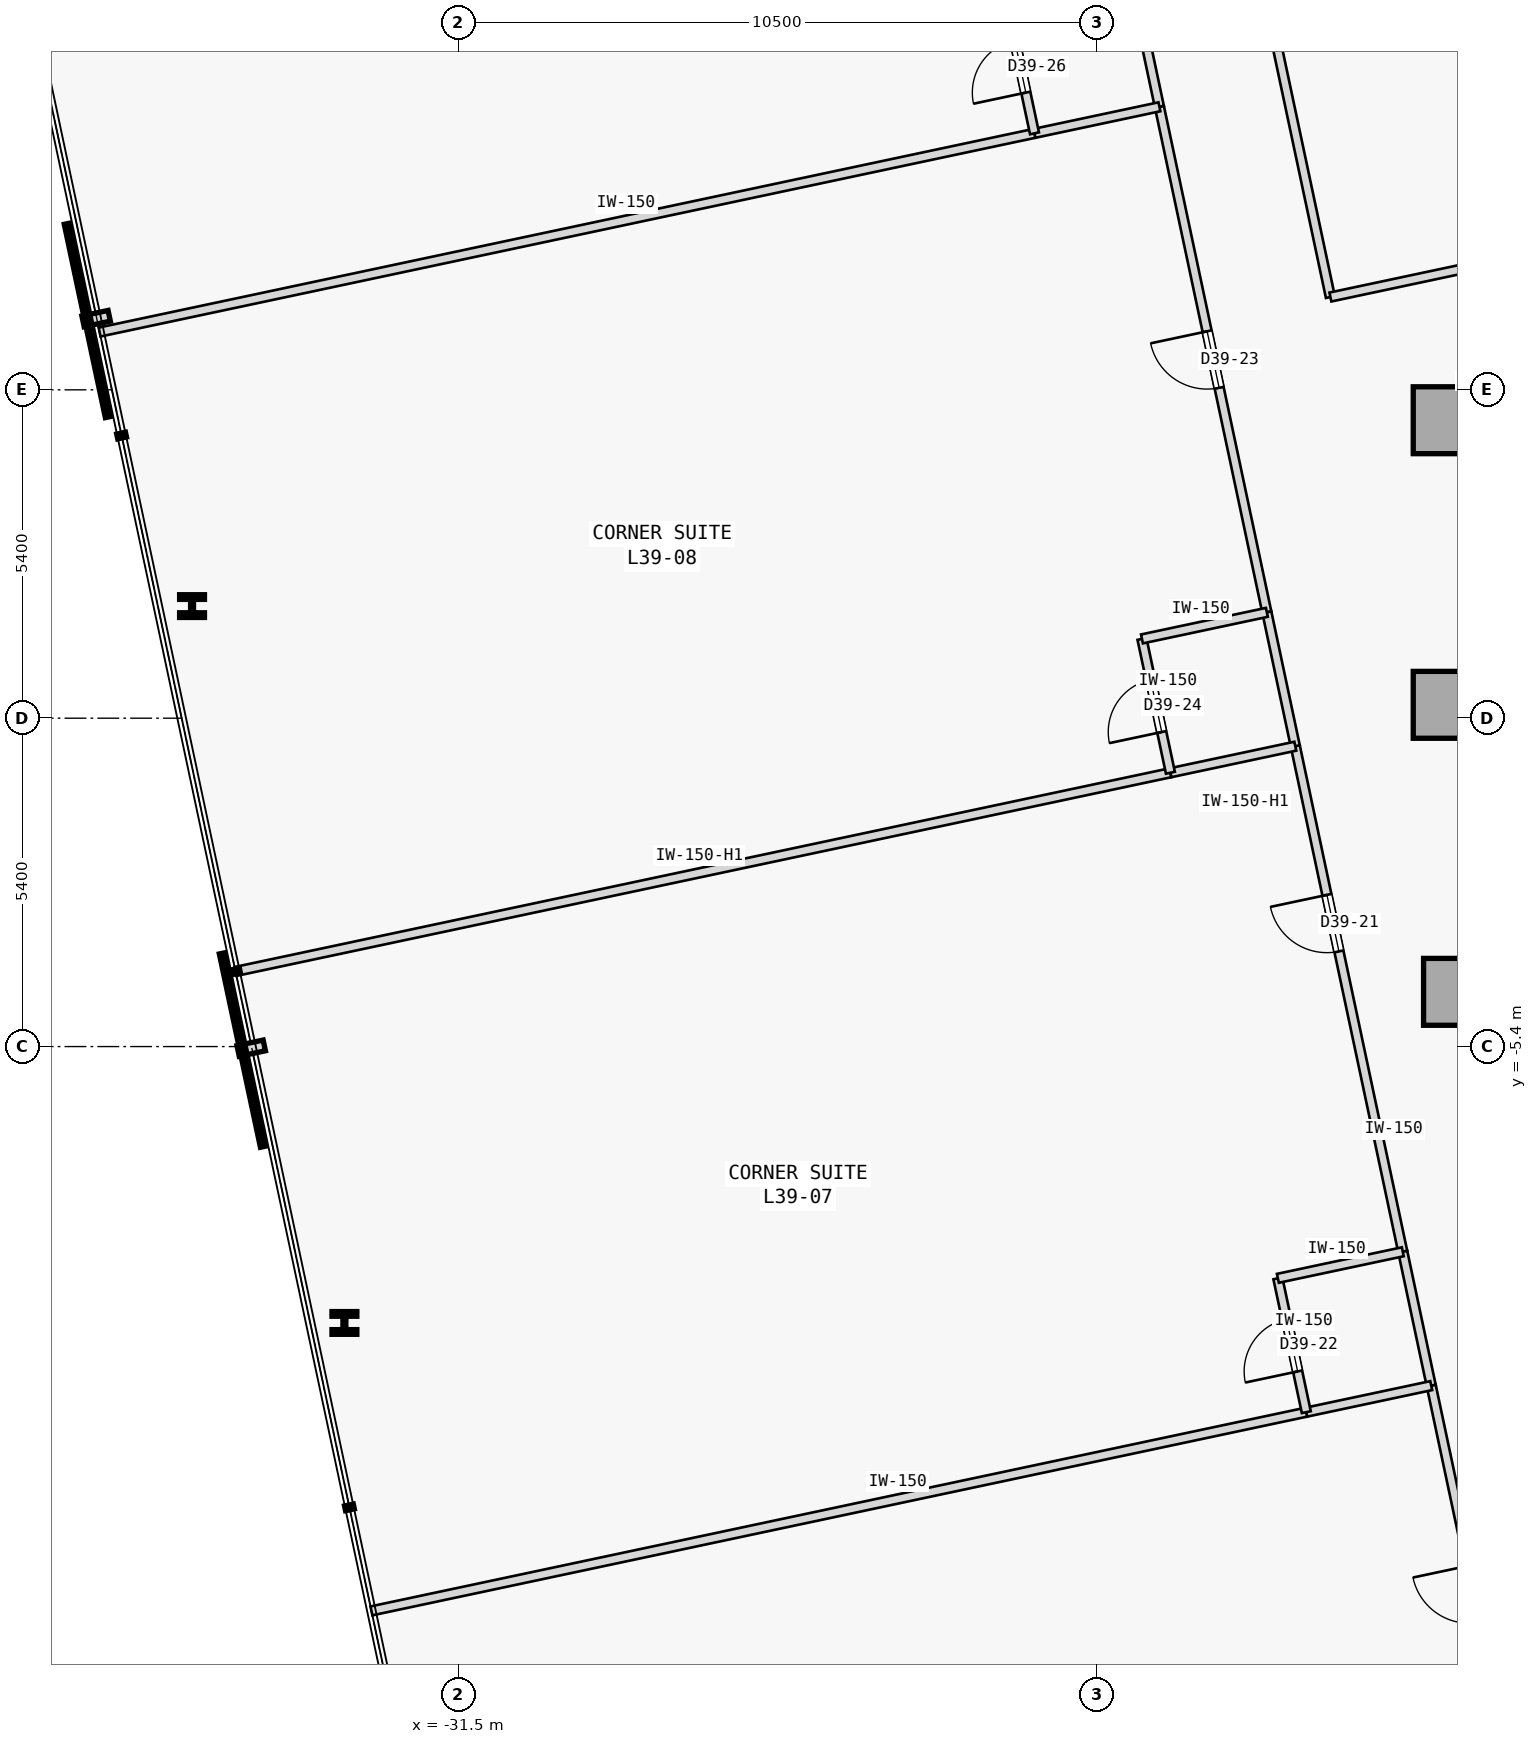
"""IFC4 building model, lengths in metres.
Left out: names, types, materials, properties, quantities, classifications, styles, units other than length and angle.
Written with IfcOpenShell. Run it as: python <this file> out.ifc"""

import sys

from ifc_helpers import new_model, si_unit, direction, frame, frame_2d, origin, origin_2d, place, context, subcontext, project, spatial, rectangle, i_section, extrude, element, fill, save


model = new_model("IFC4")
c1 = context("Model", 3, precision=1e-05, world=origin(), true_north=direction((0.0, 1.0)))
c2 = subcontext(c1, "Body", "Model", "MODEL_VIEW")
j1 = project(units=[si_unit("LENGTHUNIT", "METRE"), si_unit("PLANEANGLEUNIT", "RADIAN")], contexts=[c1])
p1 = place(None, origin())
s1 = spatial("IfcSite", under=j1, at=p1, CompositionType="ELEMENT")
p2 = place(p1, origin())
s2 = spatial("IfcBuilding", under=s1, at=p2, CompositionType="ELEMENT")
p3 = place(p2, frame((0.0, 0.0, 154.8)))
s3 = spatial("IfcBuildingStorey", under=s2, at=p3, CompositionType="ELEMENT", Elevation=154.8)
for number, where, z_axis, x_axis in (
    (1, (-15.25, 4.9, 0.0), (0.0, 0.0, 1.0), (1.0, 0.0, 0.0)),
    (2, (-15.25, 0.22, 0.0), (0.0, 0.0, 1.0), (1.0, 0.0, 0.0)),
    (3, (-15.08, -4.5, 0.0), (0.0, 0.0, 1.0), (1.0, 0.0, 0.0)),
):
    element("IfcColumn", number, at=place(p3, frame(where, z_axis=z_axis, x_axis=x_axis)), inside=s3, PredefinedType="COLUMN", context=c2, shape_type="SweptSolid", body=[
        extrude(rectangle(XDim=1.1, YDim=1.1, at=origin_2d()), origin(), (0.0, 0.0, 1.0), 3.4),
    ])
for number, where, z_axis, x_axis in (
    (4, (-35.883, 1.844, 0.0), (0.0, 0.0, 1.0), (1.0, 0.0, 0.0)),
    (5, (-33.377, -9.945, 0.0), (0.0, 0.0, 1.0), (1.0, 0.0, 0.0)),
):
    element("IfcColumn", number, at=place(p3, frame(where, z_axis=z_axis, x_axis=x_axis)), inside=s3, PredefinedType="COLUMN", context=c2, shape_type="SweptSolid", body=[
        extrude(i_section(OverallWidth=0.409, OverallDepth=0.374, WebThickness=0.048, FlangeThickness=0.077, FilletRadius=0.015, at=origin_2d()), origin(), (0.0, 0.0, 1.0), 3.4),
    ])
p4 = place(p3, frame((-17.162, 6.926, 0.0), z_axis=(0.0, 0.0, 1.0), x_axis=(-0.207911421929, 0.978147657888, 0.0)))
e6 = element("IfcWall", 6, at=p4, inside=s3, PredefinedType="PARTITIONING", context=c2, shape_type="SweptSolid", body=[
    extrude(rectangle(XDim=13.195, YDim=0.15, at=frame_2d((6.598, 0.0))), origin(), (0.0, 0.0, 1.0), 2.725),
])
p5 = place(p4, frame((6.137, 0.0, 0.0)))
e7 = element("IfcOpeningElement", 7, at=p5, cuts=e6, PredefinedType="OPENING", context=c2, shape_type="SweptSolid", body=[
    extrude(rectangle(XDim=0.92, YDim=2.15, at=frame_2d((0.46, 1.075))), frame((0.0, 0.085, 0.0), z_axis=(0.0, -1.0, 0.0), x_axis=(1.0, 0.0, 0.0)), (0.0, 0.0, 1.0), 0.17),
])
p6 = place(p3, frame((-17.162, 6.926, 0.0), z_axis=(0.0, 0.0, 1.0), x_axis=(0.978143627193, 0.207930383978, 0.0)))
e8 = element("IfcWall", 8, at=p6, inside=s3, PredefinedType="PARTITIONING", context=c2, shape_type="SweptSolid", body=[
    extrude(rectangle(XDim=7.093, YDim=0.15, at=frame_2d((3.546, 0.0))), origin(), (0.0, 0.0, 1.0), 3.175),
])
p7 = place(p3, frame((-14.049, -17.823, 0.0), z_axis=(0.0, 0.0, 1.0), x_axis=(-0.207940096132, 0.978141562567, 0.0)))
e9 = element("IfcWall", 9, at=p7, inside=s3, PredefinedType="PARTITIONING", context=c2, shape_type="SweptSolid", body=[
    extrude(rectangle(XDim=7.0, YDim=0.15, at=frame_2d((3.5, 0.0))), origin(), (0.0, 0.0, 1.0), 3.175),
])
p8 = place(p7, frame((3.025, 0.0, 0.0)))
e10 = element("IfcOpeningElement", 10, at=p8, cuts=e9, PredefinedType="OPENING", context=c2, shape_type="SweptSolid", body=[
    extrude(rectangle(XDim=0.95, YDim=2.15, at=frame_2d((0.475, 1.075))), frame((0.0, 0.085, 0.0), z_axis=(0.0, -1.0, 0.0), x_axis=(1.0, 0.0, 0.0)), (0.0, 0.0, 1.0), 0.17),
])
p9 = place(p3, frame((-15.972, -8.775, 0.0), z_axis=(0.0, 0.0, 1.0), x_axis=(-0.207894825434, 0.97815118543, 0.0)))
e11 = element("IfcWall", 11, at=p9, inside=s3, PredefinedType="PARTITIONING", context=c2, shape_type="SweptSolid", body=[
    extrude(rectangle(XDim=8.5, YDim=0.15, at=frame_2d((4.25, 0.0))), origin(), (0.0, 0.0, 1.0), 3.175),
])
p10 = place(p9, frame((5.05, 0.0, 0.0)))
e12 = element("IfcOpeningElement", 12, at=p10, cuts=e11, PredefinedType="OPENING", context=c2, shape_type="SweptSolid", body=[
    extrude(rectangle(XDim=0.95, YDim=2.15, at=frame_2d((0.475, 1.075))), frame((0.0, 0.085, 0.0), z_axis=(0.0, -1.0, 0.0), x_axis=(1.0, 0.0, 0.0)), (0.0, 0.0, 1.0), 0.17),
])
p11 = place(p3, frame((-15.504, -10.976, 0.0), z_axis=(0.0, 0.0, 1.0), x_axis=(-0.207891197838, 0.978151956427, 0.0)))
e13 = element("IfcWall", 13, at=p11, inside=s3, PredefinedType="PARTITIONING", context=c2, shape_type="SweptSolid", body=[
    extrude(rectangle(XDim=2.25, YDim=0.15, at=frame_2d((1.125, 0.0))), origin(), (0.0, 0.0, 1.0), 3.175),
])
p12 = place(p3, frame((-18.207, 1.74, 0.0), z_axis=(0.0, 0.0, 1.0), x_axis=(-0.207922306475, 0.978145344246, 0.0)))
e14 = element("IfcWall", 14, at=p12, inside=s3, PredefinedType="PARTITIONING", context=c2, shape_type="SweptSolid", body=[
    extrude(rectangle(XDim=8.5, YDim=0.15, at=frame_2d((4.25, 0.0))), origin(), (0.0, 0.0, 1.0), 3.175),
])
p13 = place(p12, frame((3.775, 0.0, 0.0)))
e15 = element("IfcOpeningElement", 15, at=p13, cuts=e14, PredefinedType="OPENING", context=c2, shape_type="SweptSolid", body=[
    extrude(rectangle(XDim=0.95, YDim=2.15, at=frame_2d((0.475, 1.075))), frame((0.0, 0.085, 0.0), z_axis=(0.0, -1.0, 0.0), x_axis=(1.0, 0.0, 0.0)), (0.0, 0.0, 1.0), 0.17),
])
p14 = place(p3, frame((-17.739, -0.46, 0.0), z_axis=(0.0, 0.0, 1.0), x_axis=(-0.207891197838, 0.978151956427, 0.0)))
e16 = element("IfcWall", 16, at=p14, inside=s3, PredefinedType="PARTITIONING", context=c2, shape_type="SweptSolid", body=[
    extrude(rectangle(XDim=2.25, YDim=0.15, at=frame_2d((1.125, 0.0))), origin(), (0.0, 0.0, 1.0), 3.175),
])
p15 = place(p3, frame((-19.974, 10.055, 0.0), z_axis=(0.0, 0.0, 1.0), x_axis=(-0.207913264065, 0.978147266328, 0.0)))
e17 = element("IfcWall", 17, at=p15, inside=s3, PredefinedType="PARTITIONING", context=c2, shape_type="SweptSolid", body=[
    extrude(rectangle(XDim=2.25, YDim=0.15, at=frame_2d((1.125, 0.0))), origin(), (0.0, 0.0, 1.0), 3.175),
])
p16 = place(p3, frame((-32.933, -14.68, 0.0), z_axis=(0.0, 0.0, 1.0), x_axis=(0.978146137903, 0.207918572776, 0.0)))
e18 = element("IfcWall", 18, at=p16, inside=s3, PredefinedType="PARTITIONING", context=c2, shape_type="SweptSolid", body=[
    extrude(rectangle(XDim=15.718, YDim=0.15, at=frame_2d((7.859, 0.0))), origin(), (0.0, 0.0, 1.0), 3.175),
])
p17 = place(p3, frame((-17.558, -11.412, 0.0), z_axis=(0.0, 0.0, 1.0), x_axis=(0.978153236239, 0.207885176084, 0.0)))
e19 = element("IfcWall", 19, at=p17, inside=s3, PredefinedType="PARTITIONING", context=c2, shape_type="SweptSolid", body=[
    extrude(rectangle(XDim=2.1, YDim=0.15, at=frame_2d((1.05, 0.0))), origin(), (0.0, 0.0, 1.0), 3.175),
])
p18 = place(p3, frame((-17.558, -11.412, 0.0), z_axis=(0.0, 0.0, 1.0), x_axis=(-0.207891197838, 0.978151956427, 0.0)))
e20 = element("IfcWall", 20, at=p18, inside=s3, PredefinedType="PARTITIONING", context=c2, shape_type="SweptSolid", body=[
    extrude(rectangle(XDim=2.25, YDim=0.15, at=frame_2d((1.125, 0.0))), origin(), (0.0, 0.0, 1.0), 3.175),
])
p19 = place(p18, frame((0.685, 0.0, 0.0)))
e21 = element("IfcOpeningElement", 21, at=p19, cuts=e20, PredefinedType="OPENING", context=c2, shape_type="SweptSolid", body=[
    extrude(rectangle(XDim=0.88, YDim=2.15, at=frame_2d((0.44, 1.075))), frame((0.0, 0.085, 0.0), z_axis=(0.0, -1.0, 0.0), x_axis=(1.0, 0.0, 0.0)), (0.0, 0.0, 1.0), 0.17),
])
p20 = place(p3, frame((-18.026, -9.211, 0.0), z_axis=(0.0, 0.0, 1.0), x_axis=(0.978153236239, 0.207885176084, 0.0)))
e22 = element("IfcWall", 22, at=p20, inside=s3, PredefinedType="PARTITIONING", context=c2, shape_type="SweptSolid", body=[
    extrude(rectangle(XDim=2.1, YDim=0.15, at=frame_2d((1.05, 0.0))), origin(), (0.0, 0.0, 1.0), 3.175),
])
p21 = place(p3, frame((-35.168, -4.165, 0.0), z_axis=(0.0, 0.0, 1.0), x_axis=(0.978149296727, 0.207903711638, 0.0)))
e23 = element("IfcWall", 23, at=p21, inside=s3, PredefinedType="PARTITIONING", context=c2, shape_type="SweptSolid", body=[
    extrude(rectangle(XDim=15.718, YDim=0.15, at=frame_2d((7.859, 0.0))), origin(), (0.0, 0.0, 1.0), 2.725),
])
p22 = place(p3, frame((-19.793, -0.897, 0.0), z_axis=(0.0, 0.0, 1.0), x_axis=(0.978134617382, 0.207972763311, 0.0)))
e24 = element("IfcWall", 24, at=p22, inside=s3, PredefinedType="PARTITIONING", context=c2, shape_type="SweptSolid", body=[
    extrude(rectangle(XDim=2.1, YDim=0.15, at=frame_2d((1.05, 0.0))), origin(), (0.0, 0.0, 1.0), 2.725),
])
p23 = place(p3, frame((-19.793, -0.897, 0.0), z_axis=(0.0, 0.0, 1.0), x_axis=(-0.207891197838, 0.978151956427, 0.0)))
e25 = element("IfcWall", 25, at=p23, inside=s3, PredefinedType="PARTITIONING", context=c2, shape_type="SweptSolid", body=[
    extrude(rectangle(XDim=2.25, YDim=0.15, at=frame_2d((1.125, 0.0))), origin(), (0.0, 0.0, 1.0), 3.175),
])
p24 = place(p23, frame((0.685, 0.0, 0.0)))
e26 = element("IfcOpeningElement", 26, at=p24, cuts=e25, PredefinedType="OPENING", context=c2, shape_type="SweptSolid", body=[
    extrude(rectangle(XDim=0.88, YDim=2.15, at=frame_2d((0.44, 1.075))), frame((0.0, 0.085, 0.0), z_axis=(0.0, -1.0, 0.0), x_axis=(1.0, 0.0, 0.0)), (0.0, 0.0, 1.0), 0.17),
])
p25 = place(p3, frame((-20.261, 1.304, 0.0), z_axis=(0.0, 0.0, 1.0), x_axis=(0.978134617382, 0.207972763311, 0.0)))
e27 = element("IfcWall", 27, at=p25, inside=s3, PredefinedType="PARTITIONING", context=c2, shape_type="SweptSolid", body=[
    extrude(rectangle(XDim=2.1, YDim=0.15, at=frame_2d((1.05, 0.0))), origin(), (0.0, 0.0, 1.0), 3.175),
])
p26 = place(p3, frame((-37.403, 6.35, 0.0), z_axis=(0.0, 0.0, 1.0), x_axis=(0.978149296727, 0.207903711638, 0.0)))
e28 = element("IfcWall", 28, at=p26, inside=s3, PredefinedType="PARTITIONING", context=c2, shape_type="SweptSolid", body=[
    extrude(rectangle(XDim=15.718, YDim=0.15, at=frame_2d((7.859, 0.0))), origin(), (0.0, 0.0, 1.0), 3.175),
])
p27 = place(p3, frame((-22.029, 9.618, 0.0), z_axis=(0.0, 0.0, 1.0), x_axis=(0.978134617382, 0.207972763311, 0.0)))
e29 = element("IfcWall", 29, at=p27, inside=s3, PredefinedType="PARTITIONING", context=c2, shape_type="SweptSolid", body=[
    extrude(rectangle(XDim=2.1, YDim=0.15, at=frame_2d((1.05, 0.0))), origin(), (0.0, 0.0, 1.0), 3.175),
])
p28 = place(p3, frame((-22.029, 9.618, 0.0), z_axis=(0.0, 0.0, 1.0), x_axis=(-0.207891197838, 0.978151956427, 0.0)))
e30 = element("IfcWall", 30, at=p28, inside=s3, PredefinedType="PARTITIONING", context=c2, shape_type="SweptSolid", body=[
    extrude(rectangle(XDim=2.25, YDim=0.15, at=frame_2d((1.125, 0.0))), origin(), (0.0, 0.0, 1.0), 3.175),
])
p29 = place(p28, frame((0.685, 0.0, 0.0)))
e31 = element("IfcOpeningElement", 31, at=p29, cuts=e30, PredefinedType="OPENING", context=c2, shape_type="SweptSolid", body=[
    extrude(rectangle(XDim=0.88, YDim=2.15, at=frame_2d((0.44, 1.075))), frame((0.0, 0.085, 0.0), z_axis=(0.0, -1.0, 0.0), x_axis=(1.0, 0.0, 0.0)), (0.0, 0.0, 1.0), 0.17),
])
p30 = place(p10, origin())
e32 = element("IfcDoor", 32, at=p30, inside=s3, OperationType="SINGLE_SWING_RIGHT", PredefinedType="DOOR", context=c2, shape_type="SweptSolid", body=[
    extrude(rectangle(XDim=0.95, YDim=2.15, at=frame_2d((0.475, 1.075))), frame((0.0, 0.025, 0.0), z_axis=(0.0, -1.0, 0.0), x_axis=(1.0, 0.0, 0.0)), (0.0, 0.0, 1.0), 0.05),
])
fill(e12, e32)
p31 = place(p19, origin())
e33 = element("IfcDoor", 33, at=p31, inside=s3, OperationType="SINGLE_SWING_LEFT", PredefinedType="DOOR", context=c2, shape_type="SweptSolid", body=[
    extrude(rectangle(XDim=0.88, YDim=2.15, at=frame_2d((0.44, 1.075))), frame((0.0, 0.025, 0.0), z_axis=(0.0, -1.0, 0.0), x_axis=(1.0, 0.0, 0.0)), (0.0, 0.0, 1.0), 0.05),
])
fill(e21, e33)
p32 = place(p13, origin())
e34 = element("IfcDoor", 34, at=p32, inside=s3, OperationType="SINGLE_SWING_RIGHT", PredefinedType="DOOR", context=c2, shape_type="SweptSolid", body=[
    extrude(rectangle(XDim=0.95, YDim=2.15, at=frame_2d((0.475, 1.075))), frame((0.0, 0.025, 0.0), z_axis=(0.0, -1.0, 0.0), x_axis=(1.0, 0.0, 0.0)), (0.0, 0.0, 1.0), 0.05),
])
fill(e15, e34)
p33 = place(p24, origin())
e35 = element("IfcDoor", 35, at=p33, inside=s3, OperationType="SINGLE_SWING_LEFT", PredefinedType="DOOR", context=c2, shape_type="SweptSolid", body=[
    extrude(rectangle(XDim=0.88, YDim=2.15, at=frame_2d((0.44, 1.075))), frame((0.0, 0.025, 0.0), z_axis=(0.0, -1.0, 0.0), x_axis=(1.0, 0.0, 0.0)), (0.0, 0.0, 1.0), 0.05),
])
fill(e26, e35)
p34 = place(p29, origin())
e36 = element("IfcDoor", 36, at=p34, inside=s3, OperationType="SINGLE_SWING_LEFT", PredefinedType="DOOR", context=c2, shape_type="SweptSolid", body=[
    extrude(rectangle(XDim=0.88, YDim=2.15, at=frame_2d((0.44, 1.075))), frame((0.0, 0.025, 0.0), z_axis=(0.0, -1.0, 0.0), x_axis=(1.0, 0.0, 0.0)), (0.0, 0.0, 1.0), 0.05),
])
fill(e31, e36)
save(model, sys.argv[1])
